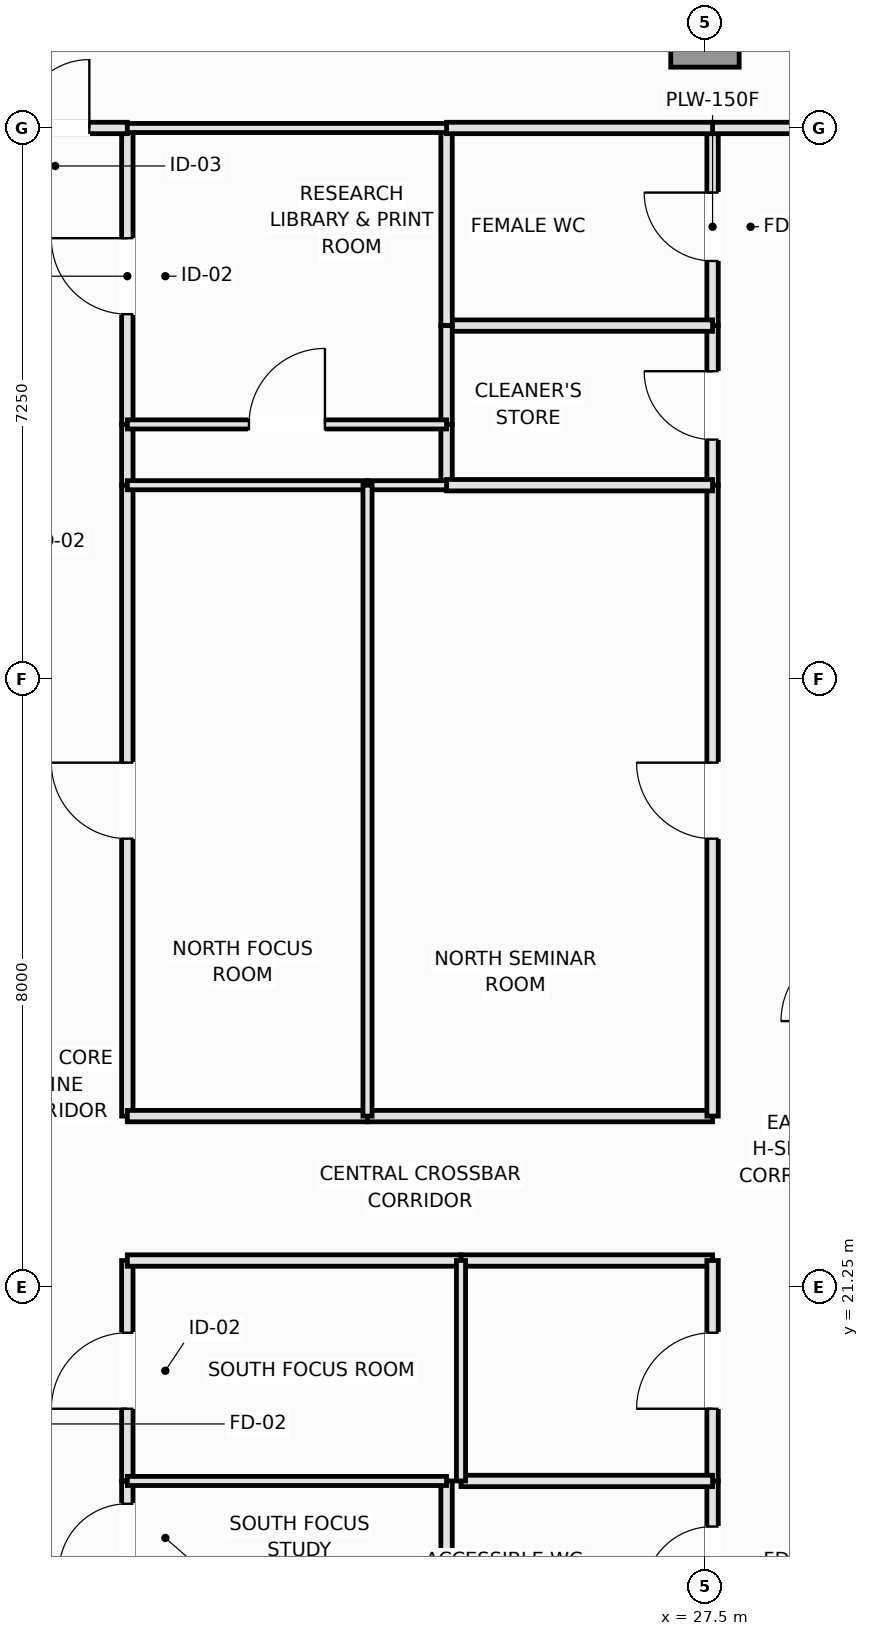
"""IFC4 building model, lengths in metres.
Left out: names, types, materials, properties, quantities, classifications, styles, units other than length and angle.
Written with IfcOpenShell. Run it as: python <this file> out.ifc"""

import sys

from ifc_helpers import new_model, si_unit, direction, frame, frame_2d, origin, origin_2d, place, context, subcontext, project, spatial, rectangle, extrude, element, fill, save


model = new_model("IFC4")
c1 = context("Model", 3, precision=1e-05, world=origin(), true_north=direction((0.0, 1.0)))
c2 = subcontext(c1, "Body", "Model", "MODEL_VIEW")
j1 = project(units=[si_unit("LENGTHUNIT", "METRE"), si_unit("PLANEANGLEUNIT", "RADIAN")], contexts=[c1])
p1 = place(None, origin())
s1 = spatial("IfcSite", under=j1, at=p1, CompositionType="ELEMENT")
p2 = place(p1, origin())
s2 = spatial("IfcBuilding", under=s1, at=p2, CompositionType="ELEMENT")
p3 = place(p2, frame((0.0, 0.0, 191.6)))
s3 = spatial("IfcBuildingStorey", under=s2, at=p3, CompositionType="ELEMENT", Elevation=191.6)
p4 = place(p3, frame((27.5, 37.75, 0.0), z_axis=(0.0, 0.0, 1.0), x_axis=(1.0, 0.0, 0.0)))
e1 = element("IfcColumn", 1, at=p4, inside=s3, PredefinedType="COLUMN", context=c2, shape_type="SweptSolid", body=[
    extrude(rectangle(XDim=0.9, YDim=0.9, at=origin_2d()), origin(), (0.0, 0.0, 1.0), 3.55),
])
p5 = place(p3, frame((19.9, 17.2, 0.0), z_axis=(0.0, 0.0, 1.0), x_axis=(0.0, 1.0, 0.0)))
e2 = element("IfcWall", 2, at=p5, inside=s3, PredefinedType="PARTITIONING", context=c2, shape_type="SweptSolid", body=[
    extrude(rectangle(XDim=1.5, YDim=0.15, at=frame_2d((0.75, 0.0))), origin(), (0.0, 0.0, 1.0), 3.37),
])
p6 = place(p5, frame((0.3, 0.0, 0.0)))
e3 = element("IfcOpeningElement", 3, at=p6, cuts=e2, PredefinedType="OPENING", context=c2, shape_type="SweptSolid", body=[
    extrude(rectangle(XDim=0.9, YDim=2.1, at=frame_2d((0.45, 1.05))), frame((0.0, 0.085, 0.0), z_axis=(0.0, -1.0, 0.0), x_axis=(1.0, 0.0, 0.0)), (0.0, 0.0, 1.0), 0.17),
])
p7 = place(p3, frame((19.9, 32.6, 0.0), z_axis=(0.0, 0.0, 1.0), x_axis=(0.0, 1.0, 0.0)))
e4 = element("IfcWall", 4, at=p7, inside=s3, PredefinedType="PARTITIONING", context=c2, shape_type="SweptSolid", body=[
    extrude(rectangle(XDim=3.9, YDim=0.15, at=frame_2d((1.95, 0.0))), origin(), (0.0, 0.0, 1.0), 3.37),
])
p8 = place(p7, frame((1.45, 0.0, 0.0)))
e5 = element("IfcOpeningElement", 5, at=p8, cuts=e4, PredefinedType="OPENING", context=c2, shape_type="SweptSolid", body=[
    extrude(rectangle(XDim=1.0, YDim=2.15, at=frame_2d((0.5, 1.075))), frame((0.0, 0.085, 0.0), z_axis=(0.0, -1.0, 0.0), x_axis=(1.0, 0.0, 0.0)), (0.0, 0.0, 1.0), 0.17),
])
p9 = place(p3, frame((19.9, 31.8, 0.0), z_axis=(0.0, 0.0, 1.0), x_axis=(0.0, 1.0, 0.0)))
e6 = element("IfcWall", 6, at=p9, inside=s3, PredefinedType="PARTITIONING", context=c2, shape_type="SweptSolid", body=[
    extrude(rectangle(XDim=0.8, YDim=0.15, at=frame_2d((0.4, 0.0))), origin(), (0.0, 0.0, 1.0), 3.37),
])
p10 = place(p3, frame((19.9, 18.7, 0.0), z_axis=(0.0, 0.0, 1.0), x_axis=(0.0, 1.0, 0.0)))
e7 = element("IfcWall", 7, at=p10, inside=s3, PredefinedType="PARTITIONING", context=c2, shape_type="SweptSolid", body=[
    extrude(rectangle(XDim=2.9, YDim=0.15, at=frame_2d((1.45, 0.0))), origin(), (0.0, 0.0, 1.0), 3.37),
])
p11 = place(p10, frame((0.95, 0.0, 0.0)))
e8 = element("IfcOpeningElement", 8, at=p11, cuts=e7, PredefinedType="OPENING", context=c2, shape_type="SweptSolid", body=[
    extrude(rectangle(XDim=1.0, YDim=2.15, at=frame_2d((0.5, 1.075))), frame((0.0, 0.085, 0.0), z_axis=(0.0, -1.0, 0.0), x_axis=(1.0, 0.0, 0.0)), (0.0, 0.0, 1.0), 0.17),
])
p12 = place(p3, frame((19.9, 23.5, 0.0), z_axis=(0.0, 0.0, 1.0), x_axis=(0.0, 1.0, 0.0)))
e9 = element("IfcWall", 9, at=p12, inside=s3, PredefinedType="PARTITIONING", context=c2, shape_type="SweptSolid", body=[
    extrude(rectangle(XDim=8.3, YDim=0.15, at=frame_2d((4.15, 0.0))), origin(), (0.0, 0.0, 1.0), 3.37),
])
p13 = place(p12, frame((3.65, 0.0, 0.0)))
e10 = element("IfcOpeningElement", 10, at=p13, cuts=e9, PredefinedType="OPENING", context=c2, shape_type="SweptSolid", body=[
    extrude(rectangle(XDim=1.0, YDim=2.15, at=frame_2d((0.5, 1.075))), frame((0.0, 0.085, 0.0), z_axis=(0.0, -1.0, 0.0), x_axis=(1.0, 0.0, 0.0)), (0.0, 0.0, 1.0), 0.17),
])
p14 = place(p3, frame((18.0, 36.5, 0.0), z_axis=(0.0, 0.0, 1.0), x_axis=(1.0, 0.0, 0.0)))
e11 = element("IfcWall", 11, at=p14, inside=s3, PredefinedType="PARTITIONING", context=c2, shape_type="SweptSolid", body=[
    extrude(rectangle(XDim=1.9, YDim=0.15, at=frame_2d((0.95, 0.0))), origin(), (0.0, 0.0, 1.0), 3.37),
])
p15 = place(p14, frame((0.5, 0.0, 0.0)))
e12 = element("IfcOpeningElement", 12, at=p15, cuts=e11, PredefinedType="OPENING", context=c2, shape_type="SweptSolid", body=[
    extrude(rectangle(XDim=0.9, YDim=2.1, at=frame_2d((0.45, 1.05))), frame((0.0, 0.085, 0.0), z_axis=(0.0, -1.0, 0.0), x_axis=(1.0, 0.0, 0.0)), (0.0, 0.0, 1.0), 0.17),
])
p16 = place(p3, frame((19.9, 21.6, 0.0), z_axis=(0.0, 0.0, 1.0), x_axis=(1.0, 0.0, 0.0)))
e13 = element("IfcWall", 13, at=p16, inside=s3, PredefinedType="PARTITIONING", context=c2, shape_type="SweptSolid", body=[
    extrude(rectangle(XDim=4.39, YDim=0.15, at=frame_2d((2.195, 0.0))), origin(), (0.0, 0.0, 1.0), 3.37),
])
p17 = place(p3, frame((24.29, 21.6, 0.0), z_axis=(0.0, 0.0, 1.0), x_axis=(1.0, 0.0, 0.0)))
e14 = element("IfcWall", 14, at=p17, inside=s3, PredefinedType="PARTITIONING", context=c2, shape_type="SweptSolid", body=[
    extrude(rectangle(XDim=3.31, YDim=0.15, at=frame_2d((1.655, 0.0))), origin(), (0.0, 0.0, 1.0), 3.37),
])
p18 = place(p3, frame((19.9, 23.5, 0.0), z_axis=(0.0, 0.0, 1.0), x_axis=(1.0, 0.0, 0.0)))
e15 = element("IfcWall", 15, at=p18, inside=s3, PredefinedType="PARTITIONING", context=c2, shape_type="SweptSolid", body=[
    extrude(rectangle(XDim=3.16, YDim=0.15, at=frame_2d((1.58, 0.0))), origin(), (0.0, 0.0, 1.0), 3.37),
])
p19 = place(p3, frame((23.06, 23.5, 0.0), z_axis=(0.0, 0.0, 1.0), x_axis=(1.0, 0.0, 0.0)))
e16 = element("IfcWall", 16, at=p19, inside=s3, PredefinedType="PARTITIONING", context=c2, shape_type="SweptSolid", body=[
    extrude(rectangle(XDim=4.54, YDim=0.15, at=frame_2d((2.27, 0.0))), origin(), (0.0, 0.0, 1.0), 3.37),
])
p20 = place(p3, frame((27.6, 33.9, 0.0), z_axis=(0.0, 0.0, 1.0), x_axis=(0.0, 1.0, 0.0)))
e17 = element("IfcWall", 17, at=p20, inside=s3, PredefinedType="PLUMBINGWALL", context=c2, shape_type="SweptSolid", body=[
    extrude(rectangle(XDim=2.6, YDim=0.15, at=frame_2d((1.3, 0.0))), origin(), (0.0, 0.0, 1.0), 3.37),
])
p21 = place(p20, frame((0.85, 0.0, 0.0)))
e18 = element("IfcOpeningElement", 18, at=p21, cuts=e17, PredefinedType="OPENING", context=c2, shape_type="SweptSolid", body=[
    extrude(rectangle(XDim=0.9, YDim=2.1, at=frame_2d((0.45, 1.05))), frame((0.0, 0.085, 0.0), z_axis=(0.0, -1.0, 0.0), x_axis=(1.0, 0.0, 0.0)), (0.0, 0.0, 1.0), 0.17),
])
p22 = place(p3, frame((27.6, 16.6, 0.0), z_axis=(0.0, 0.0, 1.0), x_axis=(0.0, 1.0, 0.0)))
e19 = element("IfcWall", 19, at=p22, inside=s3, PredefinedType="PLUMBINGWALL", context=c2, shape_type="SweptSolid", body=[
    extrude(rectangle(XDim=2.1, YDim=0.15, at=frame_2d((1.05, 0.0))), origin(), (0.0, 0.0, 1.0), 3.37),
])
p23 = place(p22, frame((0.6, 0.0, 0.0)))
e20 = element("IfcOpeningElement", 20, at=p23, cuts=e19, PredefinedType="OPENING", context=c2, shape_type="SweptSolid", body=[
    extrude(rectangle(XDim=0.9, YDim=2.1, at=frame_2d((0.45, 1.05))), frame((0.0, 0.085, 0.0), z_axis=(0.0, -1.0, 0.0), x_axis=(1.0, 0.0, 0.0)), (0.0, 0.0, 1.0), 0.17),
])
p24 = place(p3, frame((27.6, 31.8, 0.0), z_axis=(0.0, 0.0, 1.0), x_axis=(0.0, 1.0, 0.0)))
e21 = element("IfcWall", 21, at=p24, inside=s3, PredefinedType="PLUMBINGWALL", context=c2, shape_type="SweptSolid", body=[
    extrude(rectangle(XDim=2.1, YDim=0.15, at=frame_2d((1.05, 0.0))), origin(), (0.0, 0.0, 1.0), 3.37),
])
p25 = place(p24, frame((0.6, 0.0, 0.0)))
e22 = element("IfcOpeningElement", 22, at=p25, cuts=e21, PredefinedType="OPENING", context=c2, shape_type="SweptSolid", body=[
    extrude(rectangle(XDim=0.9, YDim=2.1, at=frame_2d((0.45, 1.05))), frame((0.0, 0.085, 0.0), z_axis=(0.0, -1.0, 0.0), x_axis=(1.0, 0.0, 0.0)), (0.0, 0.0, 1.0), 0.17),
])
p26 = place(p3, frame((27.6, 18.7, 0.0), z_axis=(0.0, 0.0, 1.0), x_axis=(0.0, 1.0, 0.0)))
e23 = element("IfcWall", 23, at=p26, inside=s3, PredefinedType="PARTITIONING", context=c2, shape_type="SweptSolid", body=[
    extrude(rectangle(XDim=2.9, YDim=0.15, at=frame_2d((1.45, 0.0))), origin(), (0.0, 0.0, 1.0), 3.37),
])
p27 = place(p26, frame((0.95, 0.0, 0.0)))
e24 = element("IfcOpeningElement", 24, at=p27, cuts=e23, PredefinedType="OPENING", context=c2, shape_type="SweptSolid", body=[
    extrude(rectangle(XDim=1.0, YDim=2.15, at=frame_2d((0.5, 1.075))), frame((0.0, 0.085, 0.0), z_axis=(0.0, -1.0, 0.0), x_axis=(1.0, 0.0, 0.0)), (0.0, 0.0, 1.0), 0.17),
])
p28 = place(p3, frame((27.6, 23.5, 0.0), z_axis=(0.0, 0.0, 1.0), x_axis=(0.0, 1.0, 0.0)))
e25 = element("IfcWall", 25, at=p28, inside=s3, PredefinedType="PARTITIONING", context=c2, shape_type="SweptSolid", body=[
    extrude(rectangle(XDim=8.3, YDim=0.15, at=frame_2d((4.15, 0.0))), origin(), (0.0, 0.0, 1.0), 3.37),
])
p29 = place(p28, frame((3.65, 0.0, 0.0)))
e26 = element("IfcOpeningElement", 26, at=p29, cuts=e25, PredefinedType="OPENING", context=c2, shape_type="SweptSolid", body=[
    extrude(rectangle(XDim=1.0, YDim=2.15, at=frame_2d((0.5, 1.075))), frame((0.0, 0.085, 0.0), z_axis=(0.0, -1.0, 0.0), x_axis=(1.0, 0.0, 0.0)), (0.0, 0.0, 1.0), 0.17),
])
p30 = place(p3, frame((27.6, 36.5, 0.0), z_axis=(0.0, 0.0, 1.0), x_axis=(1.0, 0.0, 0.0)))
e27 = element("IfcWall", 27, at=p30, inside=s3, PredefinedType="PARTITIONING", context=c2, shape_type="SweptSolid", body=[
    extrude(rectangle(XDim=1.9, YDim=0.15, at=frame_2d((0.95, 0.0))), origin(), (0.0, 0.0, 1.0), 3.37),
])
p31 = place(p3, frame((24.1, 33.9, 0.0), z_axis=(0.0, 0.0, 1.0), x_axis=(1.0, 0.0, 0.0)))
e28 = element("IfcWall", 28, at=p31, inside=s3, PredefinedType="PLUMBINGWALL", context=c2, shape_type="SweptSolid", body=[
    extrude(rectangle(XDim=3.5, YDim=0.15, at=frame_2d((1.75, 0.0))), origin(), (0.0, 0.0, 1.0), 3.37),
])
p32 = place(p3, frame((24.1, 33.9, 0.0), z_axis=(0.0, 0.0, 1.0), x_axis=(0.0, 1.0, 0.0)))
e29 = element("IfcWall", 29, at=p32, inside=s3, PredefinedType="PLUMBINGWALL", context=c2, shape_type="SweptSolid", body=[
    extrude(rectangle(XDim=2.6, YDim=0.15, at=frame_2d((1.3, 0.0))), origin(), (0.0, 0.0, 1.0), 3.07),
])
p33 = place(p3, frame((24.1, 36.5, 0.0), z_axis=(0.0, 0.0, 1.0), x_axis=(1.0, 0.0, 0.0)))
e30 = element("IfcWall", 30, at=p33, inside=s3, PredefinedType="PLUMBINGWALL", context=c2, shape_type="SweptSolid", body=[
    extrude(rectangle(XDim=3.5, YDim=0.15, at=frame_2d((1.75, 0.0))), origin(), (0.0, 0.0, 1.0), 3.37),
])
p34 = place(p3, frame((24.1, 17.2, 0.0), z_axis=(0.0, 0.0, 1.0), x_axis=(0.0, 1.0, 0.0)))
e31 = element("IfcWall", 31, at=p34, inside=s3, PredefinedType="PLUMBINGWALL", context=c2, shape_type="SweptSolid", body=[
    extrude(rectangle(XDim=1.5, YDim=0.15, at=frame_2d((0.75, 0.0))), origin(), (0.0, 0.0, 1.0), 3.07),
])
p35 = place(p3, frame((24.29, 18.7, 0.0), z_axis=(0.0, 0.0, 1.0), x_axis=(1.0, 0.0, 0.0)))
e32 = element("IfcWall", 32, at=p35, inside=s3, PredefinedType="PLUMBINGWALL", context=c2, shape_type="SweptSolid", body=[
    extrude(rectangle(XDim=3.31, YDim=0.15, at=frame_2d((1.655, 0.0))), origin(), (0.0, 0.0, 1.0), 3.37),
])
p36 = place(p3, frame((24.1, 32.6, 0.0), z_axis=(0.0, 0.0, 1.0), x_axis=(0.0, 1.0, 0.0)))
e33 = element("IfcWall", 33, at=p36, inside=s3, PredefinedType="PLUMBINGWALL", context=c2, shape_type="SweptSolid", body=[
    extrude(rectangle(XDim=1.3, YDim=0.15, at=frame_2d((0.65, 0.0))), origin(), (0.0, 0.0, 1.0), 3.07),
])
p37 = place(p3, frame((24.1, 31.8, 0.0), z_axis=(0.0, 0.0, 1.0), x_axis=(0.0, 1.0, 0.0)))
e34 = element("IfcWall", 34, at=p37, inside=s3, PredefinedType="PLUMBINGWALL", context=c2, shape_type="SweptSolid", body=[
    extrude(rectangle(XDim=0.8, YDim=0.15, at=frame_2d((0.4, 0.0))), origin(), (0.0, 0.0, 1.0), 3.07),
])
p38 = place(p3, frame((24.1, 31.8, 0.0), z_axis=(0.0, 0.0, 1.0), x_axis=(1.0, 0.0, 0.0)))
e35 = element("IfcWall", 35, at=p38, inside=s3, PredefinedType="PLUMBINGWALL", context=c2, shape_type="SweptSolid", body=[
    extrude(rectangle(XDim=3.5, YDim=0.15, at=frame_2d((1.75, 0.0))), origin(), (0.0, 0.0, 1.0), 3.37),
])
p39 = place(p3, frame((19.9, 18.7, 0.0), z_axis=(0.0, 0.0, 1.0), x_axis=(1.0, 0.0, 0.0)))
e36 = element("IfcWall", 36, at=p39, inside=s3, PredefinedType="PARTITIONING", context=c2, shape_type="SweptSolid", body=[
    extrude(rectangle(XDim=4.2, YDim=0.12, at=frame_2d((2.1, 0.0))), origin(), (0.0, 0.0, 1.0), 3.37),
])
p40 = place(p3, frame((19.9, 32.6, 0.0), z_axis=(0.0, 0.0, 1.0), x_axis=(1.0, 0.0, 0.0)))
e37 = element("IfcWall", 37, at=p40, inside=s3, PredefinedType="PARTITIONING", context=c2, shape_type="SweptSolid", body=[
    extrude(rectangle(XDim=4.2, YDim=0.12, at=frame_2d((2.1, 0.0))), origin(), (0.0, 0.0, 1.0), 3.37),
])
p41 = place(p40, frame((1.6, 0.0, 0.0)))
e38 = element("IfcOpeningElement", 38, at=p41, cuts=e37, PredefinedType="OPENING", context=c2, shape_type="SweptSolid", body=[
    extrude(rectangle(XDim=1.0, YDim=2.15, at=frame_2d((0.5, 1.075))), frame((0.0, 0.07, 0.0), z_axis=(0.0, -1.0, 0.0), x_axis=(1.0, 0.0, 0.0)), (0.0, 0.0, 1.0), 0.14),
])
p42 = place(p3, frame((19.9, 36.5, 0.0), z_axis=(0.0, 0.0, 1.0), x_axis=(1.0, 0.0, 0.0)))
e39 = element("IfcWall", 39, at=p42, inside=s3, PredefinedType="PARTITIONING", context=c2, shape_type="SweptSolid", body=[
    extrude(rectangle(XDim=4.2, YDim=0.12, at=frame_2d((2.1, 0.0))), origin(), (0.0, 0.0, 1.0), 3.37),
])
p43 = place(p3, frame((19.9, 31.8, 0.0), z_axis=(0.0, 0.0, 1.0), x_axis=(1.0, 0.0, 0.0)))
e40 = element("IfcWall", 40, at=p43, inside=s3, PredefinedType="PARTITIONING", context=c2, shape_type="SweptSolid", body=[
    extrude(rectangle(XDim=3.16, YDim=0.12, at=frame_2d((1.58, 0.0))), origin(), (0.0, 0.0, 1.0), 3.37),
])
p44 = place(p3, frame((23.06, 31.8, 0.0), z_axis=(0.0, 0.0, 1.0), x_axis=(1.0, 0.0, 0.0)))
e41 = element("IfcWall", 41, at=p44, inside=s3, PredefinedType="PARTITIONING", context=c2, shape_type="SweptSolid", body=[
    extrude(rectangle(XDim=1.04, YDim=0.12, at=frame_2d((0.52, 0.0))), origin(), (0.0, 0.0, 1.0), 3.37),
])
p45 = place(p3, frame((24.29, 18.7, 0.0), z_axis=(0.0, 0.0, 1.0), x_axis=(0.0, 1.0, 0.0)))
e42 = element("IfcWall", 42, at=p45, inside=s3, PredefinedType="PARTITIONING", context=c2, shape_type="SweptSolid", body=[
    extrude(rectangle(XDim=2.9, YDim=0.12, at=frame_2d((1.45, 0.0))), origin(), (0.0, 0.0, 1.0), 3.37),
])
p46 = place(p3, frame((23.06, 23.5, 0.0), z_axis=(0.0, 0.0, 1.0), x_axis=(0.0, 1.0, 0.0)))
e43 = element("IfcWall", 43, at=p46, inside=s3, PredefinedType="PARTITIONING", context=c2, shape_type="SweptSolid", body=[
    extrude(rectangle(XDim=8.3, YDim=0.12, at=frame_2d((4.15, 0.0))), origin(), (0.0, 0.0, 1.0), 3.37),
])
p47 = place(p6, origin())
e44 = element("IfcDoor", 44, at=p47, inside=s3, OperationType="SINGLE_SWING_LEFT", PredefinedType="DOOR", context=c2, shape_type="SweptSolid", body=[
    extrude(rectangle(XDim=0.9, YDim=2.1, at=frame_2d((0.45, 1.05))), frame((0.0, 0.025, 0.0), z_axis=(0.0, -1.0, 0.0), x_axis=(1.0, 0.0, 0.0)), (0.0, 0.0, 1.0), 0.05),
])
fill(e3, e44)
p48 = place(p8, origin())
e45 = element("IfcDoor", 45, at=p48, inside=s3, OperationType="SINGLE_SWING_RIGHT", PredefinedType="DOOR", context=c2, shape_type="SweptSolid", body=[
    extrude(rectangle(XDim=1.0, YDim=2.15, at=frame_2d((0.5, 1.075))), frame((0.0, 0.025, 0.0), z_axis=(0.0, -1.0, 0.0), x_axis=(1.0, 0.0, 0.0)), (0.0, 0.0, 1.0), 0.05),
])
fill(e5, e45)
p49 = place(p11, origin())
e46 = element("IfcDoor", 46, at=p49, inside=s3, OperationType="SINGLE_SWING_LEFT", PredefinedType="DOOR", context=c2, shape_type="SweptSolid", body=[
    extrude(rectangle(XDim=1.0, YDim=2.15, at=frame_2d((0.5, 1.075))), frame((0.0, 0.025, 0.0), z_axis=(0.0, -1.0, 0.0), x_axis=(1.0, 0.0, 0.0)), (0.0, 0.0, 1.0), 0.05),
])
fill(e8, e46)
p50 = place(p13, origin())
e47 = element("IfcDoor", 47, at=p50, inside=s3, OperationType="SINGLE_SWING_RIGHT", PredefinedType="DOOR", context=c2, shape_type="SweptSolid", body=[
    extrude(rectangle(XDim=1.0, YDim=2.15, at=frame_2d((0.5, 1.075))), frame((0.0, 0.025, 0.0), z_axis=(0.0, -1.0, 0.0), x_axis=(1.0, 0.0, 0.0)), (0.0, 0.0, 1.0), 0.05),
])
fill(e10, e47)
p51 = place(p15, origin())
e48 = element("IfcDoor", 48, at=p51, inside=s3, OperationType="SINGLE_SWING_RIGHT", PredefinedType="DOOR", context=c2, shape_type="SweptSolid", body=[
    extrude(rectangle(XDim=0.9, YDim=2.1, at=frame_2d((0.45, 1.05))), frame((0.0, 0.025, 0.0), z_axis=(0.0, -1.0, 0.0), x_axis=(1.0, 0.0, 0.0)), (0.0, 0.0, 1.0), 0.05),
])
fill(e12, e48)
p52 = place(p21, origin())
e49 = element("IfcDoor", 49, at=p52, inside=s3, OperationType="SINGLE_SWING_RIGHT", PredefinedType="DOOR", context=c2, shape_type="SweptSolid", body=[
    extrude(rectangle(XDim=0.9, YDim=2.1, at=frame_2d((0.45, 1.05))), frame((0.0, 0.025, 0.0), z_axis=(0.0, -1.0, 0.0), x_axis=(1.0, 0.0, 0.0)), (0.0, 0.0, 1.0), 0.05),
])
fill(e18, e49)
p53 = place(p23, origin())
e50 = element("IfcDoor", 50, at=p53, inside=s3, OperationType="SINGLE_SWING_LEFT", PredefinedType="DOOR", context=c2, shape_type="SweptSolid", body=[
    extrude(rectangle(XDim=0.9, YDim=2.1, at=frame_2d((0.45, 1.05))), frame((0.0, 0.025, 0.0), z_axis=(0.0, -1.0, 0.0), x_axis=(1.0, 0.0, 0.0)), (0.0, 0.0, 1.0), 0.05),
])
fill(e20, e50)
p54 = place(p25, origin())
e51 = element("IfcDoor", 51, at=p54, inside=s3, OperationType="SINGLE_SWING_RIGHT", PredefinedType="DOOR", context=c2, shape_type="SweptSolid", body=[
    extrude(rectangle(XDim=0.9, YDim=2.1, at=frame_2d((0.45, 1.05))), frame((0.0, 0.025, 0.0), z_axis=(0.0, -1.0, 0.0), x_axis=(1.0, 0.0, 0.0)), (0.0, 0.0, 1.0), 0.05),
])
fill(e22, e51)
p55 = place(p27, origin())
e52 = element("IfcDoor", 52, at=p55, inside=s3, OperationType="SINGLE_SWING_LEFT", PredefinedType="DOOR", context=c2, shape_type="SweptSolid", body=[
    extrude(rectangle(XDim=1.0, YDim=2.15, at=frame_2d((0.5, 1.075))), frame((0.0, 0.025, 0.0), z_axis=(0.0, -1.0, 0.0), x_axis=(1.0, 0.0, 0.0)), (0.0, 0.0, 1.0), 0.05),
])
fill(e24, e52)
p56 = place(p29, origin())
e53 = element("IfcDoor", 53, at=p56, inside=s3, OperationType="SINGLE_SWING_RIGHT", PredefinedType="DOOR", context=c2, shape_type="SweptSolid", body=[
    extrude(rectangle(XDim=1.0, YDim=2.15, at=frame_2d((0.5, 1.075))), frame((0.0, 0.025, 0.0), z_axis=(0.0, -1.0, 0.0), x_axis=(1.0, 0.0, 0.0)), (0.0, 0.0, 1.0), 0.05),
])
fill(e26, e53)
p57 = place(p41, origin())
e54 = element("IfcDoor", 54, at=p57, inside=s3, OperationType="SINGLE_SWING_RIGHT", PredefinedType="DOOR", context=c2, shape_type="SweptSolid", body=[
    extrude(rectangle(XDim=1.0, YDim=2.15, at=frame_2d((0.5, 1.075))), frame((0.0, 0.025, 0.0), z_axis=(0.0, -1.0, 0.0), x_axis=(1.0, 0.0, 0.0)), (0.0, 0.0, 1.0), 0.05),
])
fill(e38, e54)
save(model, sys.argv[1])
